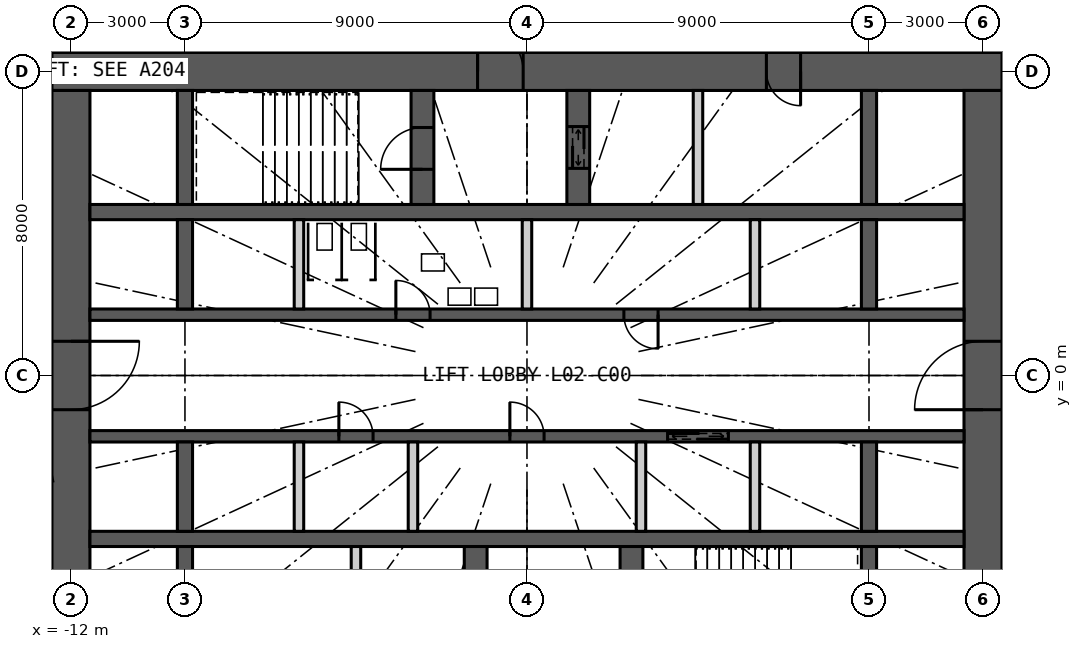
"""IFC4 building model, lengths in metres.
Left out: names, types, materials, properties, quantities, classifications, styles, units other than length and angle.
Written with IfcOpenShell. Run it as: python <this file> out.ifc"""

import sys

from ifc_helpers import new_model, si_unit, direction, frame, frame_2d, origin, place, context, subcontext, project, spatial, rectangle, extrude, element, fill, save


model = new_model("IFC4")
c1 = context("Model", 3, precision=1e-05, world=origin(), true_north=direction((0.0, 1.0)))
c2 = subcontext(c1, "Body", "Model", "MODEL_VIEW")
j1 = project(units=[si_unit("LENGTHUNIT", "METRE"), si_unit("PLANEANGLEUNIT", "RADIAN")], contexts=[c1])
p1 = place(None, origin())
s1 = spatial("IfcSite", under=j1, at=p1, CompositionType="ELEMENT")
p2 = place(p1, origin())
s2 = spatial("IfcBuilding", under=s1, at=p2, CompositionType="ELEMENT")
p3 = place(p2, frame((0.0, 0.0, 13.8)))
s3 = spatial("IfcBuildingStorey", under=s2, at=p3, CompositionType="ELEMENT", Elevation=13.8)
p4 = place(p3, frame((-12.5, 8.0, 0.0), z_axis=(0.0, 0.0, 1.0), x_axis=(1.0, 0.0, 0.0)))
e1 = element("IfcWall", 1, at=p4, inside=s3, PredefinedType="SHEAR", context=c2, shape_type="SweptSolid", body=[
    extrude(rectangle(XDim=25.0, YDim=1.0, at=frame_2d((12.5, 0.0))), origin(), (0.0, 0.0, 1.0), 5.4),
])
p5 = place(p4, frame((11.2, 0.0, 0.0)))
e2 = element("IfcOpeningElement", 2, at=p5, cuts=e1, PredefinedType="OPENING", context=c2, shape_type="SweptSolid", body=[
    extrude(rectangle(XDim=1.2, YDim=2.2, at=frame_2d((0.6, 1.1))), frame((0.0, 0.51, 0.0), z_axis=(0.0, -1.0, 0.0), x_axis=(1.0, 0.0, 0.0)), (0.0, 0.0, 1.0), 1.02),
])
p6 = place(p4, frame((18.8, 0.0, 0.0)))
e3 = element("IfcOpeningElement", 3, at=p6, cuts=e1, PredefinedType="OPENING", context=c2, shape_type="SweptSolid", body=[
    extrude(rectangle(XDim=0.9, YDim=2.2, at=frame_2d((0.45, 1.1))), frame((0.0, 0.51, 0.0), z_axis=(0.0, -1.0, 0.0), x_axis=(1.0, 0.0, 0.0)), (0.0, 0.0, 1.0), 1.02),
])
p7 = place(p3, frame((12.0, -7.5, 0.0), z_axis=(0.0, 0.0, 1.0), x_axis=(0.0, 1.0, 0.0)))
e4 = element("IfcWall", 4, at=p7, inside=s3, PredefinedType="SHEAR", context=c2, shape_type="SweptSolid", body=[
    extrude(rectangle(XDim=15.0, YDim=1.0, at=frame_2d((7.5, 0.0))), origin(), (0.0, 0.0, 1.0), 5.4),
])
p8 = place(p7, frame((6.6, 0.0, 0.0)))
e5 = element("IfcOpeningElement", 5, at=p8, cuts=e4, PredefinedType="OPENING", context=c2, shape_type="SweptSolid", body=[
    extrude(rectangle(XDim=1.8, YDim=2.2, at=frame_2d((0.9, 1.1))), frame((0.0, 0.51, 0.0), z_axis=(0.0, -1.0, 0.0), x_axis=(1.0, 0.0, 0.0)), (0.0, 0.0, 1.0), 1.02),
])
p9 = place(p3, frame((-12.0, 7.5, 0.0), z_axis=(0.0, 0.0, 1.0), x_axis=(0.0, -1.0, 0.0)))
e6 = element("IfcWall", 6, at=p9, inside=s3, PredefinedType="SHEAR", context=c2, shape_type="SweptSolid", body=[
    extrude(rectangle(XDim=15.0, YDim=1.0, at=frame_2d((7.5, 0.0))), origin(), (0.0, 0.0, 1.0), 5.4),
])
p10 = place(p9, frame((6.6, 0.0, 0.0)))
e7 = element("IfcOpeningElement", 7, at=p10, cuts=e6, PredefinedType="OPENING", context=c2, shape_type="SweptSolid", body=[
    extrude(rectangle(XDim=1.8, YDim=2.2, at=frame_2d((0.9, 1.1))), frame((0.0, 0.51, 0.0), z_axis=(0.0, -1.0, 0.0), x_axis=(1.0, 0.0, 0.0)), (0.0, 0.0, 1.0), 1.02),
])
p11 = place(p3, frame((-11.5, 4.3, 0.0), z_axis=(0.0, 0.0, 1.0), x_axis=(1.0, 0.0, 0.0)))
e8 = element("IfcWall", 8, at=p11, inside=s3, PredefinedType="SHEAR", context=c2, shape_type="SweptSolid", body=[
    extrude(rectangle(XDim=23.0, YDim=0.4, at=frame_2d((11.5, 0.0))), origin(), (0.0, 0.0, 1.0), 5.4),
])
p12 = place(p3, frame((-11.5, 1.6, 0.0), z_axis=(0.0, 0.0, 1.0), x_axis=(1.0, 0.0, 0.0)))
e9 = element("IfcWall", 9, at=p12, inside=s3, PredefinedType="SHEAR", context=c2, shape_type="SweptSolid", body=[
    extrude(rectangle(XDim=23.0, YDim=0.3, at=frame_2d((11.5, 0.0))), origin(), (0.0, 0.0, 1.0), 5.4),
])
p13 = place(p12, frame((8.05, 0.0, 0.0)))
e10 = element("IfcOpeningElement", 10, at=p13, cuts=e9, PredefinedType="OPENING", context=c2, shape_type="SweptSolid", body=[
    extrude(rectangle(XDim=0.9, YDim=2.2, at=frame_2d((0.45, 1.1))), frame((0.0, 0.16, 0.0), z_axis=(0.0, -1.0, 0.0), x_axis=(1.0, 0.0, 0.0)), (0.0, 0.0, 1.0), 0.32),
])
p14 = place(p12, frame((14.05, 0.0, 0.0)))
e11 = element("IfcOpeningElement", 11, at=p14, cuts=e9, PredefinedType="OPENING", context=c2, shape_type="SweptSolid", body=[
    extrude(rectangle(XDim=0.9, YDim=2.2, at=frame_2d((0.45, 1.1))), frame((0.0, 0.16, 0.0), z_axis=(0.0, -1.0, 0.0), x_axis=(1.0, 0.0, 0.0)), (0.0, 0.0, 1.0), 0.32),
])
p15 = place(p3, frame((-11.5, -4.3, 0.0), z_axis=(0.0, 0.0, 1.0), x_axis=(1.0, 0.0, 0.0)))
e12 = element("IfcWall", 12, at=p15, inside=s3, PredefinedType="SHEAR", context=c2, shape_type="SweptSolid", body=[
    extrude(rectangle(XDim=23.0, YDim=0.4, at=frame_2d((11.5, 0.0))), origin(), (0.0, 0.0, 1.0), 5.4),
])
p16 = place(p3, frame((-11.5, -1.6, 0.0), z_axis=(0.0, 0.0, 1.0), x_axis=(1.0, 0.0, 0.0)))
e13 = element("IfcWall", 13, at=p16, inside=s3, PredefinedType="SHEAR", context=c2, shape_type="SweptSolid", body=[
    extrude(rectangle(XDim=23.0, YDim=0.3, at=frame_2d((11.5, 0.0))), origin(), (0.0, 0.0, 1.0), 5.4),
])
p17 = place(p16, frame((15.2, 0.0, 0.0)))
e14 = element("IfcOpeningElement", 14, at=p17, cuts=e13, PredefinedType="OPENING", context=c2, shape_type="SweptSolid", body=[
    extrude(rectangle(XDim=1.6, YDim=2.4, at=frame_2d((0.8, 1.2))), frame((0.0, 0.16, 0.0), z_axis=(0.0, -1.0, 0.0), x_axis=(1.0, 0.0, 0.0)), (0.0, 0.0, 1.0), 0.32),
])
p18 = place(p16, frame((6.55, 0.0, 0.0)))
e15 = element("IfcOpeningElement", 15, at=p18, cuts=e13, PredefinedType="OPENING", context=c2, shape_type="SweptSolid", body=[
    extrude(rectangle(XDim=0.9, YDim=2.2, at=frame_2d((0.45, 1.1))), frame((0.0, 0.16, 0.0), z_axis=(0.0, -1.0, 0.0), x_axis=(1.0, 0.0, 0.0)), (0.0, 0.0, 1.0), 0.32),
])
p19 = place(p16, frame((11.05, 0.0, 0.0)))
e16 = element("IfcOpeningElement", 16, at=p19, cuts=e13, PredefinedType="OPENING", context=c2, shape_type="SweptSolid", body=[
    extrude(rectangle(XDim=0.9, YDim=2.2, at=frame_2d((0.45, 1.1))), frame((0.0, 0.16, 0.0), z_axis=(0.0, -1.0, 0.0), x_axis=(1.0, 0.0, 0.0)), (0.0, 0.0, 1.0), 0.32),
])
p20 = place(p3, frame((-9.0, 4.5, 0.0), z_axis=(0.0, 0.0, 1.0), x_axis=(0.0, 1.0, 0.0)))
e17 = element("IfcWall", 17, at=p20, inside=s3, PredefinedType="SHEAR", context=c2, shape_type="SweptSolid", body=[
    extrude(rectangle(XDim=3.0, YDim=0.4, at=frame_2d((1.5, 0.0))), origin(), (0.0, 0.0, 1.0), 5.4),
])
for number, where, z_axis, x_axis in (
    (18, (-9.0, 1.75, 0.0), (0.0, 0.0, 1.0), (0.0, 1.0, 0.0)),
    (19, (-9.0, -4.1, 0.0), (0.0, 0.0, 1.0), (0.0, 1.0, 0.0)),
):
    element("IfcWall", number, at=place(p3, frame(where, z_axis=z_axis, x_axis=x_axis)), inside=s3, PredefinedType="SHEAR", context=c2, shape_type="SweptSolid", body=[
        extrude(rectangle(XDim=2.35, YDim=0.4, at=frame_2d((1.175, 0.0))), origin(), (0.0, 0.0, 1.0), 5.4),
    ])
for number, where, z_axis, x_axis in (
    (20, (-9.0, -7.5, 0.0), (0.0, 0.0, 1.0), (0.0, 1.0, 0.0)),
    (21, (9.0, 4.5, 0.0), (0.0, 0.0, 1.0), (0.0, 1.0, 0.0)),
):
    element("IfcWall", number, at=place(p3, frame(where, z_axis=z_axis, x_axis=x_axis)), inside=s3, PredefinedType="SHEAR", context=c2, shape_type="SweptSolid", body=[
        extrude(rectangle(XDim=3.0, YDim=0.4, at=frame_2d((1.5, 0.0))), origin(), (0.0, 0.0, 1.0), 5.4),
    ])
for number, where, z_axis, x_axis in (
    (22, (9.0, 1.75, 0.0), (0.0, 0.0, 1.0), (0.0, 1.0, 0.0)),
    (23, (9.0, -4.1, 0.0), (0.0, 0.0, 1.0), (0.0, 1.0, 0.0)),
):
    element("IfcWall", number, at=place(p3, frame(where, z_axis=z_axis, x_axis=x_axis)), inside=s3, PredefinedType="SHEAR", context=c2, shape_type="SweptSolid", body=[
        extrude(rectangle(XDim=2.35, YDim=0.4, at=frame_2d((1.175, 0.0))), origin(), (0.0, 0.0, 1.0), 5.4),
    ])
p21 = place(p3, frame((9.0, -7.5, 0.0), z_axis=(0.0, 0.0, 1.0), x_axis=(0.0, 1.0, 0.0)))
e24 = element("IfcWall", 24, at=p21, inside=s3, PredefinedType="SHEAR", context=c2, shape_type="SweptSolid", body=[
    extrude(rectangle(XDim=3.0, YDim=0.4, at=frame_2d((1.5, 0.0))), origin(), (0.0, 0.0, 1.0), 5.4),
])
p22 = place(p3, frame((-2.75, 4.5, 0.0), z_axis=(0.0, 0.0, 1.0), x_axis=(0.0, 1.0, 0.0)))
e25 = element("IfcWall", 25, at=p22, inside=s3, PredefinedType="SHEAR", context=c2, shape_type="SweptSolid", body=[
    extrude(rectangle(XDim=3.0, YDim=0.6, at=frame_2d((1.5, 0.0))), origin(), (0.0, 0.0, 1.0), 5.4),
])
p23 = place(p22, frame((0.925, 0.0, 0.0)))
e26 = element("IfcOpeningElement", 26, at=p23, cuts=e25, PredefinedType="OPENING", context=c2, shape_type="SweptSolid", body=[
    extrude(rectangle(XDim=1.1, YDim=2.2, at=frame_2d((0.55, 1.1))), frame((0.0, 0.31, 0.0), z_axis=(0.0, -1.0, 0.0), x_axis=(1.0, 0.0, 0.0)), (0.0, 0.0, 1.0), 0.62),
])
p24 = place(p3, frame((1.35, 4.5, 0.0), z_axis=(0.0, 0.0, 1.0), x_axis=(0.0, 1.0, 0.0)))
e27 = element("IfcWall", 27, at=p24, inside=s3, PredefinedType="SHEAR", context=c2, shape_type="SweptSolid", body=[
    extrude(rectangle(XDim=3.0, YDim=0.6, at=frame_2d((1.5, 0.0))), origin(), (0.0, 0.0, 1.0), 5.4),
])
p25 = place(p24, frame((0.95, 0.0, 0.0)))
e28 = element("IfcOpeningElement", 28, at=p25, cuts=e27, PredefinedType="OPENING", context=c2, shape_type="SweptSolid", body=[
    extrude(rectangle(XDim=1.1, YDim=2.2, at=frame_2d((0.55, 1.1))), frame((0.0, 0.31, 0.0), z_axis=(0.0, -1.0, 0.0), x_axis=(1.0, 0.0, 0.0)), (0.0, 0.0, 1.0), 0.62),
])
p26 = place(p3, frame((4.5, 4.5, 0.0), z_axis=(0.0, 0.0, 1.0), x_axis=(0.0, 1.0, 0.0)))
e29 = element("IfcWall", 29, at=p26, inside=s3, PredefinedType="PARTITIONING", context=c2, shape_type="SweptSolid", body=[
    extrude(rectangle(XDim=3.0, YDim=0.25, at=frame_2d((1.5, 0.0))), origin(), (0.0, 0.0, 1.0), 5.4),
])
p27 = place(p3, frame((2.75, -7.5, 0.0), z_axis=(0.0, 0.0, 1.0), x_axis=(0.0, 1.0, 0.0)))
e30 = element("IfcWall", 30, at=p27, inside=s3, PredefinedType="SHEAR", context=c2, shape_type="SweptSolid", body=[
    extrude(rectangle(XDim=3.0, YDim=0.6, at=frame_2d((1.5, 0.0))), origin(), (0.0, 0.0, 1.0), 5.4),
])
p28 = place(p27, frame((0.975, 0.0, 0.0)))
e31 = element("IfcOpeningElement", 31, at=p28, cuts=e30, PredefinedType="OPENING", context=c2, shape_type="SweptSolid", body=[
    extrude(rectangle(XDim=1.1, YDim=2.2, at=frame_2d((0.55, 1.1))), frame((0.0, 0.31, 0.0), z_axis=(0.0, -1.0, 0.0), x_axis=(1.0, 0.0, 0.0)), (0.0, 0.0, 1.0), 0.62),
])
p29 = place(p3, frame((-1.35, -7.5, 0.0), z_axis=(0.0, 0.0, 1.0), x_axis=(0.0, 1.0, 0.0)))
e32 = element("IfcWall", 32, at=p29, inside=s3, PredefinedType="SHEAR", context=c2, shape_type="SweptSolid", body=[
    extrude(rectangle(XDim=3.0, YDim=0.6, at=frame_2d((1.5, 0.0))), origin(), (0.0, 0.0, 1.0), 5.4),
])
p30 = place(p29, frame((0.95, 0.0, 0.0)))
e33 = element("IfcOpeningElement", 33, at=p30, cuts=e32, PredefinedType="OPENING", context=c2, shape_type="SweptSolid", body=[
    extrude(rectangle(XDim=1.1, YDim=2.2, at=frame_2d((0.55, 1.1))), frame((0.0, 0.31, 0.0), z_axis=(0.0, -1.0, 0.0), x_axis=(1.0, 0.0, 0.0)), (0.0, 0.0, 1.0), 0.62),
])
p31 = place(p3, frame((-4.5, -7.5, 0.0), z_axis=(0.0, 0.0, 1.0), x_axis=(0.0, 1.0, 0.0)))
e34 = element("IfcWall", 34, at=p31, inside=s3, PredefinedType="PARTITIONING", context=c2, shape_type="SweptSolid", body=[
    extrude(rectangle(XDim=3.0, YDim=0.25, at=frame_2d((1.5, 0.0))), origin(), (0.0, 0.0, 1.0), 5.4),
])
for number, where, z_axis, x_axis in (
    (35, (-6.0, 1.75, 0.0), (0.0, 0.0, 1.0), (0.0, 1.0, 0.0)),
    (36, (0.0, 1.75, 0.0), (0.0, 0.0, 1.0), (0.0, 1.0, 0.0)),
    (37, (6.0, 1.75, 0.0), (0.0, 0.0, 1.0), (0.0, 1.0, 0.0)),
    (38, (-6.0, -4.1, 0.0), (0.0, 0.0, 1.0), (0.0, 1.0, 0.0)),
    (39, (-3.0, -4.1, 0.0), (0.0, 0.0, 1.0), (0.0, 1.0, 0.0)),
    (40, (3.0, -4.1, 0.0), (0.0, 0.0, 1.0), (0.0, 1.0, 0.0)),
    (41, (6.0, -4.1, 0.0), (0.0, 0.0, 1.0), (0.0, 1.0, 0.0)),
):
    element("IfcWall", number, at=place(p3, frame(where, z_axis=z_axis, x_axis=x_axis)), inside=s3, PredefinedType="PARTITIONING", context=c2, shape_type="SweptSolid", body=[
        extrude(rectangle(XDim=2.35, YDim=0.25, at=frame_2d((1.175, 0.0))), origin(), (0.0, 0.0, 1.0), 5.4),
    ])
p32 = place(p3, frame((-18.9, -4.052, 0.0), z_axis=(0.0, 0.0, 1.0), x_axis=(0.977781666858, 0.2096258857, 0.0)))
e42 = element("IfcWall", 42, at=p32, inside=s3, PredefinedType="PARTITIONING", context=c2, shape_type="SweptSolid", body=[
    extrude(rectangle(XDim=6.545, YDim=0.2, at=frame_2d((3.273, 0.0))), origin(), (0.0, 0.0, 1.0), 5.15),
])
p33 = place(p32, frame((2.373, 0.0, 0.0)))
e43 = element("IfcOpeningElement", 43, at=p33, cuts=e42, PredefinedType="OPENING", context=c2, shape_type="SweptSolid", body=[
    extrude(rectangle(XDim=1.8, YDim=2.4, at=frame_2d((0.9, 1.2))), frame((0.0, 0.11, 0.0), z_axis=(0.0, -1.0, 0.0), x_axis=(1.0, 0.0, 0.0)), (0.0, 0.0, 1.0), 0.22),
])
p34 = place(p5, origin())
e44 = element("IfcDoor", 44, at=p34, inside=s3, OperationType="SINGLE_SWING_LEFT", PredefinedType="DOOR", context=c2, shape_type="SweptSolid", body=[
    extrude(rectangle(XDim=1.2, YDim=2.2, at=frame_2d((0.6, 1.1))), frame((0.0, 0.025, 0.0), z_axis=(0.0, -1.0, 0.0), x_axis=(1.0, 0.0, 0.0)), (0.0, 0.0, 1.0), 0.05),
])
fill(e2, e44)
p35 = place(p23, origin())
e45 = element("IfcDoor", 45, at=p35, inside=s3, OperationType="SINGLE_SWING_LEFT", PredefinedType="DOOR", context=c2, shape_type="SweptSolid", body=[
    extrude(rectangle(XDim=1.1, YDim=2.2, at=frame_2d((0.55, 1.1))), frame((0.0, 0.025, 0.0), z_axis=(0.0, -1.0, 0.0), x_axis=(1.0, 0.0, 0.0)), (0.0, 0.0, 1.0), 0.05),
])
fill(e26, e45)
p36 = place(p25, origin())
e46 = element("IfcDoor", 46, at=p36, inside=s3, OperationType="DOUBLE_DOOR_SLIDING", PredefinedType="DOOR", context=c2, shape_type="SweptSolid", body=[
    extrude(rectangle(XDim=1.1, YDim=2.2, at=frame_2d((0.55, 1.1))), frame((0.0, 0.025, 0.0), z_axis=(0.0, -1.0, 0.0), x_axis=(1.0, 0.0, 0.0)), (0.0, 0.0, 1.0), 0.05),
])
fill(e28, e46)
p37 = place(p6, origin())
e47 = element("IfcDoor", 47, at=p37, inside=s3, OperationType="SINGLE_SWING_RIGHT", PredefinedType="DOOR", context=c2, shape_type="SweptSolid", body=[
    extrude(rectangle(XDim=0.9, YDim=2.2, at=frame_2d((0.45, 1.1))), frame((0.0, 0.025, 0.0), z_axis=(0.0, -1.0, 0.0), x_axis=(1.0, 0.0, 0.0)), (0.0, 0.0, 1.0), 0.05),
])
fill(e3, e47)
p38 = place(p17, origin())
e48 = element("IfcDoor", 48, at=p38, inside=s3, OperationType="DOUBLE_DOOR_SLIDING", PredefinedType="DOOR", context=c2, shape_type="SweptSolid", body=[
    extrude(rectangle(XDim=1.6, YDim=2.4, at=frame_2d((0.8, 1.2))), frame((0.0, 0.025, 0.0), z_axis=(0.0, -1.0, 0.0), x_axis=(1.0, 0.0, 0.0)), (0.0, 0.0, 1.0), 0.05),
])
fill(e14, e48)
p39 = place(p13, origin())
e49 = element("IfcDoor", 49, at=p39, inside=s3, OperationType="SINGLE_SWING_LEFT", PredefinedType="DOOR", context=c2, shape_type="SweptSolid", body=[
    extrude(rectangle(XDim=0.9, YDim=2.2, at=frame_2d((0.45, 1.1))), frame((0.0, 0.025, 0.0), z_axis=(0.0, -1.0, 0.0), x_axis=(1.0, 0.0, 0.0)), (0.0, 0.0, 1.0), 0.05),
])
fill(e10, e49)
p40 = place(p14, origin())
e50 = element("IfcDoor", 50, at=p40, inside=s3, OperationType="SINGLE_SWING_RIGHT", PredefinedType="DOOR", context=c2, shape_type="SweptSolid", body=[
    extrude(rectangle(XDim=0.9, YDim=2.2, at=frame_2d((0.45, 1.1))), frame((0.0, 0.025, 0.0), z_axis=(0.0, -1.0, 0.0), x_axis=(1.0, 0.0, 0.0)), (0.0, 0.0, 1.0), 0.05),
])
fill(e11, e50)
p41 = place(p18, origin())
e51 = element("IfcDoor", 51, at=p41, inside=s3, OperationType="SINGLE_SWING_LEFT", PredefinedType="DOOR", context=c2, shape_type="SweptSolid", body=[
    extrude(rectangle(XDim=0.9, YDim=2.2, at=frame_2d((0.45, 1.1))), frame((0.0, 0.025, 0.0), z_axis=(0.0, -1.0, 0.0), x_axis=(1.0, 0.0, 0.0)), (0.0, 0.0, 1.0), 0.05),
])
fill(e15, e51)
p42 = place(p19, origin())
e52 = element("IfcDoor", 52, at=p42, inside=s3, OperationType="SINGLE_SWING_LEFT", PredefinedType="DOOR", context=c2, shape_type="SweptSolid", body=[
    extrude(rectangle(XDim=0.9, YDim=2.2, at=frame_2d((0.45, 1.1))), frame((0.0, 0.025, 0.0), z_axis=(0.0, -1.0, 0.0), x_axis=(1.0, 0.0, 0.0)), (0.0, 0.0, 1.0), 0.05),
])
fill(e16, e52)
p43 = place(p8, origin())
e53 = element("IfcDoor", 53, at=p43, inside=s3, OperationType="DOUBLE_DOOR_DOUBLE_SWING", PredefinedType="DOOR", context=c2, shape_type="SweptSolid", body=[
    extrude(rectangle(XDim=1.8, YDim=2.2, at=frame_2d((0.9, 1.1))), frame((0.0, 0.025, 0.0), z_axis=(0.0, -1.0, 0.0), x_axis=(1.0, 0.0, 0.0)), (0.0, 0.0, 1.0), 0.05),
])
fill(e5, e53)
p44 = place(p10, origin())
e54 = element("IfcDoor", 54, at=p44, inside=s3, OperationType="DOUBLE_DOOR_DOUBLE_SWING", PredefinedType="DOOR", context=c2, shape_type="SweptSolid", body=[
    extrude(rectangle(XDim=1.8, YDim=2.2, at=frame_2d((0.9, 1.1))), frame((0.0, 0.025, 0.0), z_axis=(0.0, -1.0, 0.0), x_axis=(1.0, 0.0, 0.0)), (0.0, 0.0, 1.0), 0.05),
])
fill(e7, e54)
save(model, sys.argv[1])
